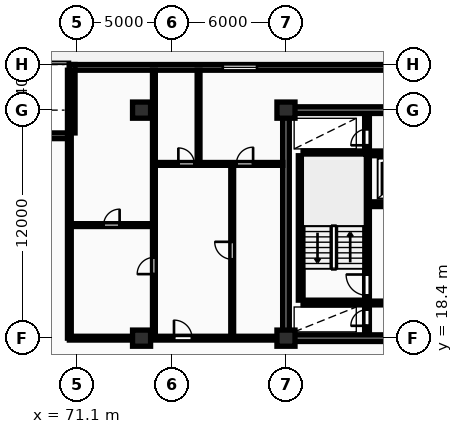
"""IFC4 building model, lengths in metres.
Left out: names, types, materials, properties, quantities, classifications, styles, units other than length and angle.
Written with IfcOpenShell. Run it as: python <this file> out.ifc"""

import sys

from ifc_helpers import new_model, si_unit, direction, frame, frame_2d, origin, origin_2d, place, context, subcontext, project, spatial, rectangle, extrude, element, fill, save


model = new_model("IFC4")
c1 = context("Model", 3, precision=1e-05, world=origin(), true_north=direction((0.0, 1.0)))
c2 = subcontext(c1, "Body", "Model", "MODEL_VIEW")
j1 = project(units=[si_unit("LENGTHUNIT", "METRE"), si_unit("PLANEANGLEUNIT", "RADIAN")], contexts=[c1])
p1 = place(None, origin())
s1 = spatial("IfcSite", under=j1, at=p1, CompositionType="ELEMENT")
p2 = place(p1, origin())
s2 = spatial("IfcBuilding", under=s1, at=p2, CompositionType="ELEMENT")
p3 = place(p2, frame((0.0, 0.0, 24.0)))
s3 = spatial("IfcBuildingStorey", under=s2, at=p3, CompositionType="ELEMENT", Elevation=24.0)
for number, where, z_axis, x_axis in (
    (1, (74.5, 18.4, 0.0), (0.0, 0.0, 1.0), (1.0, 0.0, 0.0)),
    (2, (74.5, 30.4, 0.0), (0.0, 0.0, 1.0), (1.0, 0.0, 0.0)),
    (3, (82.1, 18.4, 0.0), (0.0, 0.0, 1.0), (1.0, 0.0, 0.0)),
    (4, (82.1, 30.4, 0.0), (0.0, 0.0, 1.0), (1.0, 0.0, 0.0)),
):
    element("IfcColumn", number, at=place(p3, frame(where, z_axis=z_axis, x_axis=x_axis)), inside=s3, PredefinedType="COLUMN", context=c2, shape_type="SweptSolid", body=[
        extrude(rectangle(XDim=0.95, YDim=0.85, at=origin_2d()), origin(), (0.0, 0.0, 1.0), 3.25),
    ])
p4 = place(p3, frame((132.7, 32.65, 0.0), z_axis=(0.0, 0.0, 1.0), x_axis=(-1.0, 0.0, 0.0)))
e5 = element("IfcWall", 5, at=p4, inside=s3, PredefinedType="STANDARD", context=c2, shape_type="SweptSolid", body=[
    extrude(rectangle(XDim=62.0, YDim=0.3, at=frame_2d((31.0, 0.0))), origin(), (0.0, 0.0, 1.0), 2.97),
])
p5 = place(p4, frame((52.125, 0.0, 0.85)))
e6 = element("IfcOpeningElement", 6, at=p5, cuts=e5, PredefinedType="OPENING", context=c2, shape_type="SweptSolid", body=[
    extrude(rectangle(XDim=1.8, YDim=1.8, at=frame_2d((0.9, 0.9))), frame((0.0, 0.16, 0.0), z_axis=(0.0, -1.0, 0.0), x_axis=(1.0, 0.0, 0.0)), (0.0, 0.0, 1.0), 0.32),
])
p6 = place(p4, frame((8.775, 0.0, 0.85)))
e7 = element("IfcOpeningElement", 7, at=p6, cuts=e5, PredefinedType="OPENING", context=c2, shape_type="SweptSolid", body=[
    extrude(rectangle(XDim=1.8, YDim=1.8, at=frame_2d((0.9, 0.9))), frame((0.0, 0.16, 0.0), z_axis=(0.0, -1.0, 0.0), x_axis=(1.0, 0.0, 0.0)), (0.0, 0.0, 1.0), 0.32),
])
p7 = place(p3, frame((70.85, 32.8, 0.0), z_axis=(0.0, 0.0, 1.0), x_axis=(0.0, -1.0, 0.0)))
e8 = element("IfcWall", 8, at=p7, inside=s3, PredefinedType="STANDARD", context=c2, shape_type="SweptSolid", body=[
    extrude(rectangle(XDim=3.6, YDim=0.3, at=frame_2d((1.8, 0.0))), origin(), (0.0, 0.0, 1.0), 2.97),
])
p8 = place(p3, frame((70.7, 29.05, 0.0), z_axis=(0.0, 0.0, 1.0), x_axis=(-1.0, 0.0, 0.0)))
e9 = element("IfcWall", 9, at=p8, inside=s3, PredefinedType="STANDARD", context=c2, shape_type="SweptSolid", body=[
    extrude(rectangle(XDim=3.6, YDim=0.3, at=frame_2d((1.8, 0.0))), origin(), (0.0, 0.0, 1.0), 2.97),
])
p9 = place(p3, frame((81.925, 30.4, 0.0), z_axis=(0.0, 0.0, 1.0), x_axis=(1.0, 0.0, 0.0)))
e10 = element("IfcWall", 10, at=p9, inside=s3, PredefinedType="SHEAR", context=c2, shape_type="SweptSolid", body=[
    extrude(rectangle(XDim=36.265, YDim=0.35, at=frame_2d((18.132, 0.0))), origin(), (0.0, 0.0, 1.0), 3.25),
])
p10 = place(p3, frame((82.1, 18.575, 0.0), z_axis=(0.0, 0.0, 1.0), x_axis=(0.0, 1.0, 0.0)))
e11 = element("IfcWall", 11, at=p10, inside=s3, PredefinedType="SHEAR", context=c2, shape_type="SweptSolid", body=[
    extrude(rectangle(XDim=11.65, YDim=0.35, at=frame_2d((5.825, 0.0))), origin(), (0.0, 0.0, 1.0), 3.25),
])
p11 = place(p3, frame((81.925, 18.4, 0.0), z_axis=(0.0, 0.0, 1.0), x_axis=(1.0, 0.0, 0.0)))
e12 = element("IfcWall", 12, at=p11, inside=s3, PredefinedType="SHEAR", context=c2, shape_type="SweptSolid", body=[
    extrude(rectangle(XDim=36.265, YDim=0.35, at=frame_2d((18.132, 0.0))), origin(), (0.0, 0.0, 1.0), 3.25),
])
p12 = place(p11, frame((5.675, 0.0, 0.0)))
e13 = element("IfcOpeningElement", 13, at=p12, cuts=e12, PredefinedType="OPENING", context=c2, shape_type="SweptSolid", body=[
    extrude(rectangle(XDim=1.0, YDim=2.15, at=frame_2d((0.5, 1.075))), frame((0.0, 0.185, 0.0), z_axis=(0.0, -1.0, 0.0), x_axis=(1.0, 0.0, 0.0)), (0.0, 0.0, 1.0), 0.37),
])
p13 = place(p11, frame((21.925, 0.0, 0.0)))
e14 = element("IfcOpeningElement", 14, at=p13, cuts=e12, PredefinedType="OPENING", context=c2, shape_type="SweptSolid", body=[
    extrude(rectangle(XDim=1.5, YDim=2.2, at=frame_2d((0.75, 1.1))), frame((0.0, 0.185, 0.0), z_axis=(0.0, -1.0, 0.0), x_axis=(1.0, 0.0, 0.0)), (0.0, 0.0, 1.0), 0.37),
])
p14 = place(p11, frame((29.875, 0.0, 0.0)))
e15 = element("IfcOpeningElement", 15, at=p14, cuts=e12, PredefinedType="OPENING", context=c2, shape_type="SweptSolid", body=[
    extrude(rectangle(XDim=1.0, YDim=2.15, at=frame_2d((0.5, 1.075))), frame((0.0, 0.185, 0.0), z_axis=(0.0, -1.0, 0.0), x_axis=(1.0, 0.0, 0.0)), (0.0, 0.0, 1.0), 0.37),
])
p15 = place(p3, frame((82.875, 20.4, 0.0), z_axis=(0.0, 0.0, 1.0), x_axis=(0.0, 1.0, 0.0)))
e16 = element("IfcWall", 16, at=p15, inside=s3, PredefinedType="SHEAR", context=c2, shape_type="SweptSolid", body=[
    extrude(rectangle(XDim=7.6, YDim=0.25, at=frame_2d((3.8, 0.0))), origin(), (0.0, 0.0, 1.0), 3.25),
])
p16 = place(p3, frame((86.365, 18.6, 0.0), z_axis=(0.0, 0.0, 1.0), x_axis=(0.0, 1.0, 0.0)))
e17 = element("IfcWall", 17, at=p16, inside=s3, PredefinedType="SHEAR", context=c2, shape_type="SweptSolid", body=[
    extrude(rectangle(XDim=11.6, YDim=0.25, at=frame_2d((5.8, 0.0))), origin(), (0.0, 0.0, 1.0), 3.25),
])
p17 = place(p16, frame((0.45, 0.0, 0.0)))
e18 = element("IfcOpeningElement", 18, at=p17, cuts=e17, PredefinedType="OPENING", context=c2, shape_type="SweptSolid", body=[
    extrude(rectangle(XDim=0.85, YDim=2.05, at=frame_2d((0.425, 1.025))), frame((0.0, 0.135, 0.0), z_axis=(0.0, -1.0, 0.0), x_axis=(1.0, 0.0, 0.0)), (0.0, 0.0, 1.0), 0.27),
])
p18 = place(p16, frame((2.05, 0.0, 0.0)))
e19 = element("IfcOpeningElement", 19, at=p18, cuts=e17, PredefinedType="OPENING", context=c2, shape_type="SweptSolid", body=[
    extrude(rectangle(XDim=1.1, YDim=2.1, at=frame_2d((0.55, 1.05))), frame((0.0, 0.135, 0.0), z_axis=(0.0, -1.0, 0.0), x_axis=(1.0, 0.0, 0.0)), (0.0, 0.0, 1.0), 0.27),
])
p19 = place(p16, frame((9.95, 0.0, 0.0)))
e20 = element("IfcOpeningElement", 20, at=p19, cuts=e17, PredefinedType="OPENING", context=c2, shape_type="SweptSolid", body=[
    extrude(rectangle(XDim=0.85, YDim=2.05, at=frame_2d((0.425, 1.025))), frame((0.0, 0.135, 0.0), z_axis=(0.0, -1.0, 0.0), x_axis=(1.0, 0.0, 0.0)), (0.0, 0.0, 1.0), 0.27),
])
p20 = place(p3, frame((83.0, 20.275, 0.0), z_axis=(0.0, 0.0, 1.0), x_axis=(1.0, 0.0, 0.0)))
e21 = element("IfcWall", 21, at=p20, inside=s3, PredefinedType="SHEAR", context=c2, shape_type="SweptSolid", body=[
    extrude(rectangle(XDim=3.24, YDim=0.25, at=frame_2d((1.62, 0.0))), origin(), (0.0, 0.0, 1.0), 3.25),
])
p21 = place(p3, frame((83.0, 28.125, 0.0), z_axis=(0.0, 0.0, 1.0), x_axis=(1.0, 0.0, 0.0)))
e22 = element("IfcWall", 22, at=p21, inside=s3, PredefinedType="SHEAR", context=c2, shape_type="SweptSolid", body=[
    extrude(rectangle(XDim=7.82, YDim=0.25, at=frame_2d((3.91, 0.0))), origin(), (0.0, 0.0, 1.0), 3.25),
])
p22 = place(p3, frame((86.5, 25.45, 0.0), z_axis=(0.0, 0.0, 1.0), x_axis=(1.0, 0.0, 0.0)))
e23 = element("IfcWall", 23, at=p22, inside=s3, PredefinedType="SHEAR", context=c2, shape_type="SweptSolid", body=[
    extrude(rectangle(XDim=4.32, YDim=0.25, at=frame_2d((2.16, 0.0))), origin(), (0.0, 0.0, 1.0), 3.25),
])
p23 = place(p22, frame((1.14, 0.0, 0.0)))
e24 = element("IfcOpeningElement", 24, at=p23, cuts=e23, PredefinedType="OPENING", context=c2, shape_type="SweptSolid", body=[
    extrude(rectangle(XDim=1.12, YDim=2.12, at=frame_2d((0.56, 1.06))), frame((0.0, 0.135, 0.0), z_axis=(0.0, -1.0, 0.0), x_axis=(1.0, 0.0, 0.0)), (0.0, 0.0, 1.0), 0.27),
])
p24 = place(p22, frame((3.25, 0.0, 0.0)))
e25 = element("IfcOpeningElement", 25, at=p24, cuts=e23, PredefinedType="OPENING", context=c2, shape_type="SweptSolid", body=[
    extrude(rectangle(XDim=0.85, YDim=2.05, at=frame_2d((0.425, 1.025))), frame((0.0, 0.135, 0.0), z_axis=(0.0, -1.0, 0.0), x_axis=(1.0, 0.0, 0.0)), (0.0, 0.0, 1.0), 0.27),
])
p25 = place(p3, frame((86.5, 20.25, 0.0), z_axis=(0.0, 0.0, 1.0), x_axis=(1.0, 0.0, 0.0)))
e26 = element("IfcWall", 26, at=p25, inside=s3, PredefinedType="PARTITIONING", context=c2, shape_type="SweptSolid", body=[
    extrude(rectangle(XDim=4.32, YDim=0.2, at=frame_2d((2.16, 0.0))), origin(), (0.0, 0.0, 1.0), 2.97),
])
p26 = place(p25, frame((1.4, 0.0, 0.0)))
e27 = element("IfcOpeningElement", 27, at=p26, cuts=e26, PredefinedType="OPENING", context=c2, shape_type="SweptSolid", body=[
    extrude(rectangle(XDim=1.1, YDim=2.1, at=frame_2d((0.55, 1.05))), frame((0.0, 0.11, 0.0), z_axis=(0.0, -1.0, 0.0), x_axis=(1.0, 0.0, 0.0)), (0.0, 0.0, 1.0), 0.22),
])
p27 = place(p3, frame((70.7, 18.4, 0.0), z_axis=(0.0, 0.0, 1.0), x_axis=(0.0, 1.0, 0.0)))
e28 = element("IfcWall", 28, at=p27, inside=s3, PredefinedType="PARTITIONING", context=c2, shape_type="SweptSolid", body=[
    extrude(rectangle(XDim=14.1, YDim=0.2, at=frame_2d((7.05, 0.0))), origin(), (0.0, 0.0, 1.0), 2.97),
])
p28 = place(p3, frame((70.7, 24.35, 0.0), z_axis=(0.0, 0.0, 1.0), x_axis=(1.0, 0.0, 0.0)))
e29 = element("IfcWall", 29, at=p28, inside=s3, PredefinedType="PARTITIONING", context=c2, shape_type="SweptSolid", body=[
    extrude(rectangle(XDim=4.45, YDim=0.15, at=frame_2d((2.225, 0.0))), origin(), (0.0, 0.0, 1.0), 2.97),
])
p29 = place(p28, frame((1.805, 0.0, 0.0)))
e30 = element("IfcOpeningElement", 30, at=p29, cuts=e29, PredefinedType="OPENING", context=c2, shape_type="SweptSolid", body=[
    extrude(rectangle(XDim=0.84, YDim=2.04, at=frame_2d((0.42, 1.02))), frame((0.0, 0.085, 0.0), z_axis=(0.0, -1.0, 0.0), x_axis=(1.0, 0.0, 0.0)), (0.0, 0.0, 1.0), 0.17),
])
p30 = place(p3, frame((75.15, 18.45, 0.0), z_axis=(0.0, 0.0, 1.0), x_axis=(0.0, 1.0, 0.0)))
e31 = element("IfcWall", 31, at=p30, inside=s3, PredefinedType="PARTITIONING", context=c2, shape_type="SweptSolid", body=[
    extrude(rectangle(XDim=14.05, YDim=0.15, at=frame_2d((7.025, 0.0))), origin(), (0.0, 0.0, 1.0), 2.97),
])
p31 = place(p30, frame((3.32, 0.0, 0.0)))
e32 = element("IfcOpeningElement", 32, at=p31, cuts=e31, PredefinedType="OPENING", context=c2, shape_type="SweptSolid", body=[
    extrude(rectangle(XDim=0.88, YDim=2.06, at=frame_2d((0.44, 1.03))), frame((0.0, 0.085, 0.0), z_axis=(0.0, -1.0, 0.0), x_axis=(1.0, 0.0, 0.0)), (0.0, 0.0, 1.0), 0.17),
])
p32 = place(p3, frame((79.27, 18.45, 0.0), z_axis=(0.0, 0.0, 1.0), x_axis=(0.0, 1.0, 0.0)))
e33 = element("IfcWall", 33, at=p32, inside=s3, PredefinedType="PARTITIONING", context=c2, shape_type="SweptSolid", body=[
    extrude(rectangle(XDim=9.12, YDim=0.15, at=frame_2d((4.56, 0.0))), origin(), (0.0, 0.0, 1.0), 2.97),
])
p33 = place(p32, frame((4.1, 0.0, 0.0)))
e34 = element("IfcOpeningElement", 34, at=p33, cuts=e33, PredefinedType="OPENING", context=c2, shape_type="SweptSolid", body=[
    extrude(rectangle(XDim=0.92, YDim=2.08, at=frame_2d((0.46, 1.04))), frame((0.0, 0.085, 0.0), z_axis=(0.0, -1.0, 0.0), x_axis=(1.0, 0.0, 0.0)), (0.0, 0.0, 1.0), 0.17),
])
p34 = place(p3, frame((77.5, 27.57, 0.0), z_axis=(0.0, 0.0, 1.0), x_axis=(0.0, 1.0, 0.0)))
e35 = element("IfcWall", 35, at=p34, inside=s3, PredefinedType="PARTITIONING", context=c2, shape_type="SweptSolid", body=[
    extrude(rectangle(XDim=4.93, YDim=0.15, at=frame_2d((2.465, 0.0))), origin(), (0.0, 0.0, 1.0), 2.97),
])
p35 = place(p3, frame((75.17, 27.57, 0.0), z_axis=(0.0, 0.0, 1.0), x_axis=(1.0, 0.0, 0.0)))
e36 = element("IfcWall", 36, at=p35, inside=s3, PredefinedType="PARTITIONING", context=c2, shape_type="SweptSolid", body=[
    extrude(rectangle(XDim=6.76, YDim=0.15, at=frame_2d((3.38, 0.0))), origin(), (0.0, 0.0, 1.0), 2.97),
])
p36 = place(p35, frame((1.266, 0.0, 0.0)))
e37 = element("IfcOpeningElement", 37, at=p36, cuts=e36, PredefinedType="OPENING", context=c2, shape_type="SweptSolid", body=[
    extrude(rectangle(XDim=0.84, YDim=2.04, at=frame_2d((0.42, 1.02))), frame((0.0, 0.085, 0.0), z_axis=(0.0, -1.0, 0.0), x_axis=(1.0, 0.0, 0.0)), (0.0, 0.0, 1.0), 0.17),
])
p37 = place(p35, frame((4.32, 0.0, 0.0)))
e38 = element("IfcOpeningElement", 38, at=p37, cuts=e36, PredefinedType="OPENING", context=c2, shape_type="SweptSolid", body=[
    extrude(rectangle(XDim=0.88, YDim=2.06, at=frame_2d((0.44, 1.03))), frame((0.0, 0.085, 0.0), z_axis=(0.0, -1.0, 0.0), x_axis=(1.0, 0.0, 0.0)), (0.0, 0.0, 1.0), 0.17),
])
p38 = place(p3, frame((70.7, 18.4, 0.0), z_axis=(0.0, 0.0, 1.0), x_axis=(1.0, 0.0, 0.0)))
e39 = element("IfcWall", 39, at=p38, inside=s3, PredefinedType="PARTITIONING", context=c2, shape_type="SweptSolid", body=[
    extrude(rectangle(XDim=11.25, YDim=0.2, at=frame_2d((5.625, 0.0))), origin(), (0.0, 0.0, 1.0), 2.37),
])
p39 = place(p38, frame((5.506, 0.0, 0.0)))
e40 = element("IfcOpeningElement", 40, at=p39, cuts=e39, PredefinedType="OPENING", context=c2, shape_type="SweptSolid", body=[
    extrude(rectangle(XDim=0.95, YDim=2.15, at=frame_2d((0.475, 1.075))), frame((0.0, 0.11, 0.0), z_axis=(0.0, -1.0, 0.0), x_axis=(1.0, 0.0, 0.0)), (0.0, 0.0, 1.0), 0.22),
])
p40 = place(p5, origin())
e41 = element("IfcWindow", 41, at=p40, inside=s3, PartitioningType="SINGLE_PANEL", PredefinedType="WINDOW", context=c2, shape_type="SweptSolid", body=[
    extrude(rectangle(XDim=1.8, YDim=1.8, at=frame_2d((0.9, 0.9))), frame((0.0, 0.03, 0.0), z_axis=(0.0, -1.0, 0.0), x_axis=(1.0, 0.0, 0.0)), (0.0, 0.0, 1.0), 0.06),
])
fill(e6, e41)
p41 = place(p17, origin())
e42 = element("IfcDoor", 42, at=p41, inside=s3, OperationType="SINGLE_SWING_LEFT", PredefinedType="DOOR", context=c2, shape_type="SweptSolid", body=[
    extrude(rectangle(XDim=0.85, YDim=2.05, at=frame_2d((0.425, 1.025))), frame((0.0, 0.025, 0.0), z_axis=(0.0, -1.0, 0.0), x_axis=(1.0, 0.0, 0.0)), (0.0, 0.0, 1.0), 0.05),
])
fill(e18, e42)
p42 = place(p18, origin())
e43 = element("IfcDoor", 43, at=p42, inside=s3, OperationType="SINGLE_SWING_RIGHT", PredefinedType="DOOR", context=c2, shape_type="SweptSolid", body=[
    extrude(rectangle(XDim=1.1, YDim=2.1, at=frame_2d((0.55, 1.05))), frame((0.0, 0.025, 0.0), z_axis=(0.0, -1.0, 0.0), x_axis=(1.0, 0.0, 0.0)), (0.0, 0.0, 1.0), 0.05),
])
fill(e19, e43)
p43 = place(p19, origin())
e44 = element("IfcDoor", 44, at=p43, inside=s3, OperationType="SINGLE_SWING_LEFT", PredefinedType="DOOR", context=c2, shape_type="SweptSolid", body=[
    extrude(rectangle(XDim=0.85, YDim=2.05, at=frame_2d((0.425, 1.025))), frame((0.0, 0.025, 0.0), z_axis=(0.0, -1.0, 0.0), x_axis=(1.0, 0.0, 0.0)), (0.0, 0.0, 1.0), 0.05),
])
fill(e20, e44)
p44 = place(p29, origin())
e45 = element("IfcDoor", 45, at=p44, inside=s3, OperationType="SINGLE_SWING_RIGHT", PredefinedType="DOOR", context=c2, shape_type="SweptSolid", body=[
    extrude(rectangle(XDim=0.84, YDim=2.04, at=frame_2d((0.42, 1.02))), frame((0.0, 0.025, 0.0), z_axis=(0.0, -1.0, 0.0), x_axis=(1.0, 0.0, 0.0)), (0.0, 0.0, 1.0), 0.05),
])
fill(e30, e45)
p45 = place(p31, origin())
e46 = element("IfcDoor", 46, at=p45, inside=s3, OperationType="SINGLE_SWING_LEFT", PredefinedType="DOOR", context=c2, shape_type="SweptSolid", body=[
    extrude(rectangle(XDim=0.88, YDim=2.06, at=frame_2d((0.44, 1.03))), frame((0.0, 0.025, 0.0), z_axis=(0.0, -1.0, 0.0), x_axis=(1.0, 0.0, 0.0)), (0.0, 0.0, 1.0), 0.05),
])
fill(e32, e46)
p46 = place(p33, origin())
e47 = element("IfcDoor", 47, at=p46, inside=s3, OperationType="SINGLE_SWING_RIGHT", PredefinedType="DOOR", context=c2, shape_type="SweptSolid", body=[
    extrude(rectangle(XDim=0.92, YDim=2.08, at=frame_2d((0.46, 1.04))), frame((0.0, 0.025, 0.0), z_axis=(0.0, -1.0, 0.0), x_axis=(1.0, 0.0, 0.0)), (0.0, 0.0, 1.0), 0.05),
])
fill(e34, e47)
p47 = place(p36, origin())
e48 = element("IfcDoor", 48, at=p47, inside=s3, OperationType="SINGLE_SWING_LEFT", PredefinedType="DOOR", context=c2, shape_type="SweptSolid", body=[
    extrude(rectangle(XDim=0.84, YDim=2.04, at=frame_2d((0.42, 1.02))), frame((0.0, 0.025, 0.0), z_axis=(0.0, -1.0, 0.0), x_axis=(1.0, 0.0, 0.0)), (0.0, 0.0, 1.0), 0.05),
])
fill(e37, e48)
p48 = place(p37, origin())
e49 = element("IfcDoor", 49, at=p48, inside=s3, OperationType="SINGLE_SWING_RIGHT", PredefinedType="DOOR", context=c2, shape_type="SweptSolid", body=[
    extrude(rectangle(XDim=0.88, YDim=2.06, at=frame_2d((0.44, 1.03))), frame((0.0, 0.025, 0.0), z_axis=(0.0, -1.0, 0.0), x_axis=(1.0, 0.0, 0.0)), (0.0, 0.0, 1.0), 0.05),
])
fill(e38, e49)
p49 = place(p39, origin())
e50 = element("IfcDoor", 50, at=p49, inside=s3, OperationType="SINGLE_SWING_LEFT", PredefinedType="DOOR", context=c2, shape_type="SweptSolid", body=[
    extrude(rectangle(XDim=0.95, YDim=2.15, at=frame_2d((0.475, 1.075))), frame((0.0, 0.025, 0.0), z_axis=(0.0, -1.0, 0.0), x_axis=(1.0, 0.0, 0.0)), (0.0, 0.0, 1.0), 0.05),
])
fill(e40, e50)
save(model, sys.argv[1])
